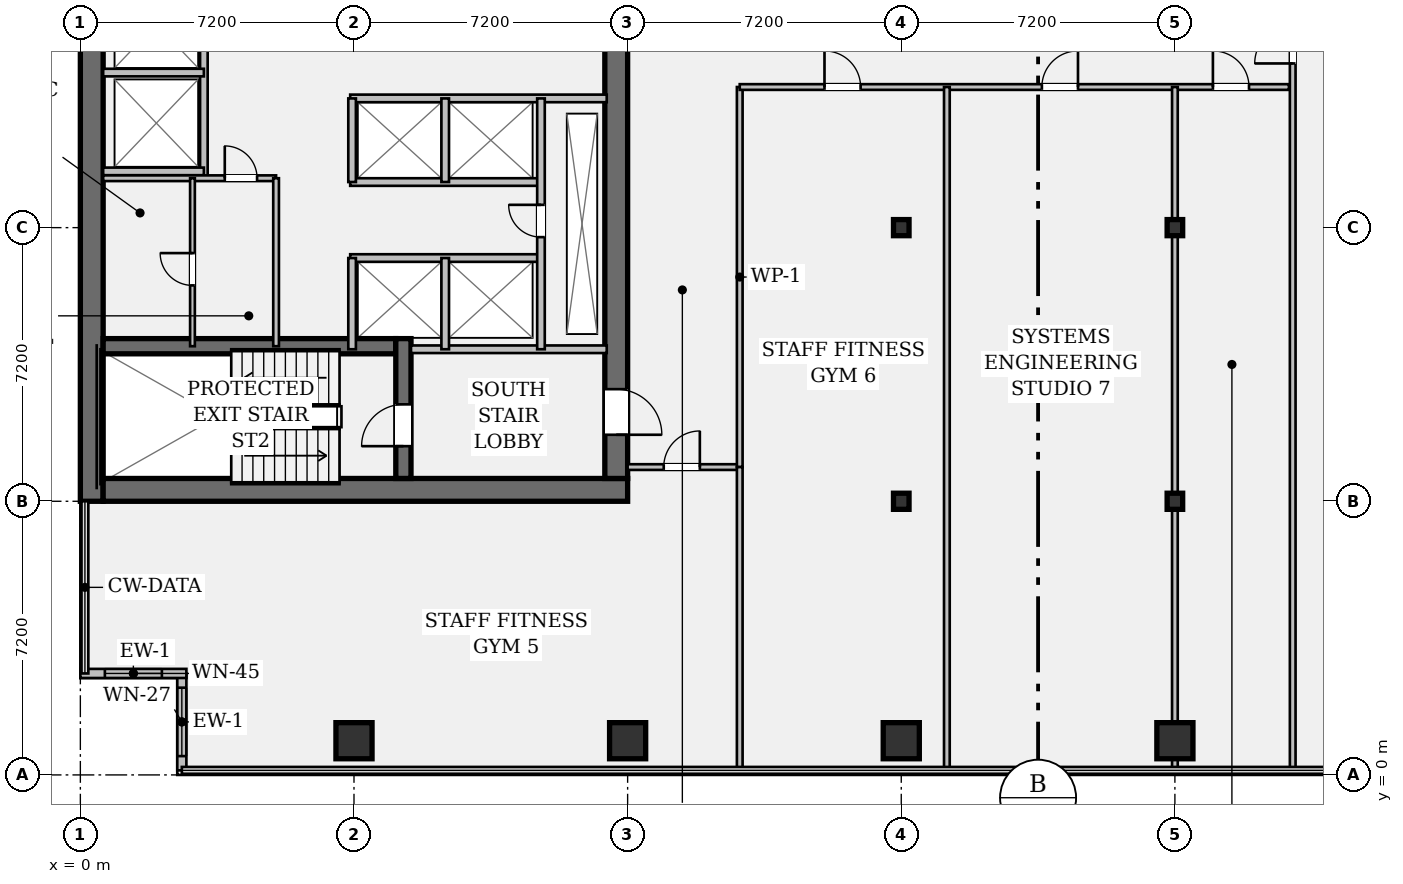
"""IFC4 building model, lengths in metres.
Left out: names, types, materials, properties, quantities, classifications, styles, units other than length and angle.
Written with IfcOpenShell. Run it as: python <this file> out.ifc"""

import sys

from ifc_helpers import new_model, si_unit, direction, frame, frame_2d, origin, origin_2d, place, context, subcontext, project, spatial, rectangle, hollow_rectangle, i_section, extrude, element, fill, save


model = new_model("IFC4")
c1 = context("Model", 3, precision=1e-05, world=origin(), true_north=direction((0.0, 1.0)))
c2 = subcontext(c1, "Body", "Model", "MODEL_VIEW")
j1 = project(units=[si_unit("LENGTHUNIT", "METRE"), si_unit("PLANEANGLEUNIT", "RADIAN")], contexts=[c1])
p1 = place(None, origin())
s1 = spatial("IfcSite", under=j1, at=p1, CompositionType="ELEMENT")
p2 = place(p1, origin())
s2 = spatial("IfcBuilding", under=s1, at=p2, CompositionType="ELEMENT")
p3 = place(p2, frame((0.0, 0.0, 81.2)))
s3 = spatial("IfcBuildingStorey", under=s2, at=p3, CompositionType="ELEMENT", Elevation=81.2)
p4 = place(p3, frame((0.3, 7.2, 0.0), z_axis=(0.0, 0.0, 1.0), x_axis=(0.0, 1.0, 0.0)))
e1 = element("IfcWall", 1, at=p4, inside=s3, PredefinedType="SHEAR", context=c2, shape_type="SweptSolid", body=[
    extrude(rectangle(XDim=28.8, YDim=0.6, at=frame_2d((14.4, 0.0))), origin(), (0.0, 0.0, 1.0), 3.57),
])
p5 = place(p3, frame((0.6, 7.5, 0.0), z_axis=(0.0, 0.0, 1.0), x_axis=(1.0, 0.0, 0.0)))
e2 = element("IfcWall", 2, at=p5, inside=s3, PredefinedType="SHEAR", context=c2, shape_type="SweptSolid", body=[
    extrude(rectangle(XDim=13.8, YDim=0.6, at=frame_2d((6.9, 0.0))), origin(), (0.0, 0.0, 1.0), 3.57),
])
p6 = place(p3, frame((14.1, 35.4, 0.0), z_axis=(0.0, 0.0, 1.0), x_axis=(0.0, -1.0, 0.0)))
e3 = element("IfcWall", 3, at=p6, inside=s3, PredefinedType="SHEAR", context=c2, shape_type="SweptSolid", body=[
    extrude(rectangle(XDim=27.6, YDim=0.6, at=frame_2d((13.8, 0.0))), origin(), (0.0, 0.0, 1.0), 3.57),
])
p7 = place(p6, frame((1.3, 0.0, 0.0)))
e4 = element("IfcOpeningElement", 4, at=p7, cuts=e3, PredefinedType="OPENING", context=c2, shape_type="SweptSolid", body=[
    extrude(rectangle(XDim=1.2, YDim=2.15, at=frame_2d((0.6, 1.075))), frame((0.0, 0.312, 0.0), z_axis=(0.0, -1.0, 0.0), x_axis=(1.0, 0.0, 0.0)), (0.0, 0.0, 1.0), 0.624),
])
p8 = place(p6, frame((25.25, 0.0, 0.0)))
e5 = element("IfcOpeningElement", 5, at=p8, cuts=e3, PredefinedType="OPENING", context=c2, shape_type="SweptSolid", body=[
    extrude(rectangle(XDim=1.2, YDim=2.15, at=frame_2d((0.6, 1.075))), frame((0.0, 0.312, 0.0), z_axis=(0.0, -1.0, 0.0), x_axis=(1.0, 0.0, 0.0)), (0.0, 0.0, 1.0), 0.624),
])
p9 = place(p6, frame((14.6, 0.0, 0.0)))
e6 = element("IfcOpeningElement", 6, at=p9, cuts=e3, PredefinedType="OPENING", context=c2, shape_type="SweptSolid", body=[
    extrude(rectangle(XDim=1.6, YDim=2.2, at=frame_2d((0.8, 1.1))), frame((0.0, 0.312, 0.0), z_axis=(0.0, -1.0, 0.0), x_axis=(1.0, 0.0, 0.0)), (0.0, 0.0, 1.0), 0.624),
])
p10 = place(p3, frame((0.6, 11.28, 0.0), z_axis=(0.0, 0.0, 1.0), x_axis=(1.0, 0.0, 0.0)))
e7 = element("IfcWall", 7, at=p10, inside=s3, PredefinedType="SHEAR", context=c2, shape_type="SweptSolid", body=[
    extrude(rectangle(XDim=7.7, YDim=0.4, at=frame_2d((3.85, 0.0))), origin(), (0.0, 0.0, 1.0), 3.57),
])
p11 = place(p3, frame((8.5, 7.8, 0.0), z_axis=(0.0, 0.0, 1.0), x_axis=(0.0, 1.0, 0.0)))
e8 = element("IfcWall", 8, at=p11, inside=s3, PredefinedType="SHEAR", context=c2, shape_type="SweptSolid", body=[
    extrude(rectangle(XDim=3.68, YDim=0.4, at=frame_2d((1.84, 0.0))), origin(), (0.0, 0.0, 1.0), 3.57),
])
p12 = place(p11, frame((0.85, 0.0, 0.0)))
e9 = element("IfcOpeningElement", 9, at=p12, cuts=e8, PredefinedType="OPENING", context=c2, shape_type="SweptSolid", body=[
    extrude(rectangle(XDim=1.1, YDim=2.15, at=frame_2d((0.55, 1.075))), frame((0.0, 0.212, 0.0), z_axis=(0.0, -1.0, 0.0), x_axis=(1.0, 0.0, 0.0)), (0.0, 0.0, 1.0), 0.424),
])
for number, where, z_axis, x_axis in (
    (10, (7.2, 0.9, 0.0), (0.0, 0.0, 1.0), (1.0, 0.0, 0.0)),
    (11, (14.4, 0.9, 0.0), (0.0, 0.0, 1.0), (1.0, 0.0, 0.0)),
    (12, (21.6, 0.9, 0.0), (0.0, 0.0, 1.0), (1.0, 0.0, 0.0)),
):
    element("IfcColumn", number, at=place(p3, frame(where, z_axis=z_axis, x_axis=x_axis)), inside=s3, PredefinedType="COLUMN", context=c2, shape_type="SweptSolid", body=[
        extrude(hollow_rectangle(XDim=0.95, YDim=0.95, WallThickness=0.06, at=origin_2d()), origin(), (0.0, 0.0, 1.0), 3.57),
    ])
for number, where, z_axis, x_axis in (
    (13, (21.6, 7.2, 0.0), (0.0, 0.0, 1.0), (1.0, 0.0, 0.0)),
    (14, (21.6, 14.4, 0.0), (0.0, 0.0, 1.0), (1.0, 0.0, 0.0)),
):
    element("IfcColumn", number, at=place(p3, frame(where, z_axis=z_axis, x_axis=x_axis)), inside=s3, PredefinedType="COLUMN", context=c2, shape_type="SweptSolid", body=[
        extrude(i_section(OverallWidth=0.409, OverallDepth=0.424, WebThickness=0.033, FlangeThickness=0.052, FilletRadius=0.018, at=origin_2d()), origin(), (0.0, 0.0, 1.0), 3.57),
    ])
p13 = place(p3, frame((28.8, 0.9, 0.0), z_axis=(0.0, 0.0, 1.0), x_axis=(1.0, 0.0, 0.0)))
e15 = element("IfcColumn", 15, at=p13, inside=s3, PredefinedType="COLUMN", context=c2, shape_type="SweptSolid", body=[
    extrude(hollow_rectangle(XDim=0.95, YDim=0.95, WallThickness=0.06, at=origin_2d()), origin(), (0.0, 0.0, 1.0), 3.57),
])
for number, where, z_axis, x_axis in (
    (16, (28.8, 7.2, 0.0), (0.0, 0.0, 1.0), (1.0, 0.0, 0.0)),
    (17, (28.8, 14.4, 0.0), (0.0, 0.0, 1.0), (1.0, 0.0, 0.0)),
):
    element("IfcColumn", number, at=place(p3, frame(where, z_axis=z_axis, x_axis=x_axis)), inside=s3, PredefinedType="COLUMN", context=c2, shape_type="SweptSolid", body=[
        extrude(i_section(OverallWidth=0.409, OverallDepth=0.424, WebThickness=0.033, FlangeThickness=0.052, FilletRadius=0.018, at=origin_2d()), origin(), (0.0, 0.0, 1.0), 3.57),
    ])
p14 = place(p3, frame((2.67, 0.12, 0.0), z_axis=(0.0, 0.0, 1.0), x_axis=(0.0, 1.0, 0.0)))
e18 = element("IfcWall", 18, at=p14, inside=s3, PredefinedType="STANDARD", context=c2, shape_type="SweptSolid", body=[
    extrude(rectangle(XDim=2.55, YDim=0.24, at=frame_2d((1.275, 0.0))), origin(), (0.0, 0.0, 1.0), 3.57),
])
p15 = place(p14, frame((0.375, 0.0, 0.95)))
e19 = element("IfcOpeningElement", 19, at=p15, cuts=e18, PredefinedType="OPENING", context=c2, shape_type="SweptSolid", body=[
    extrude(rectangle(XDim=1.8, YDim=1.35, at=frame_2d((0.9, 0.675))), frame((0.0, 0.132, 0.0), z_axis=(0.0, -1.0, 0.0), x_axis=(1.0, 0.0, 0.0)), (0.0, 0.0, 1.0), 0.264),
])
p16 = place(p3, frame((2.79, 2.67, 0.0), z_axis=(0.0, 0.0, 1.0), x_axis=(-1.0, 0.0, 0.0)))
e20 = element("IfcWall", 20, at=p16, inside=s3, PredefinedType="STANDARD", context=c2, shape_type="SweptSolid", body=[
    extrude(rectangle(XDim=2.79, YDim=0.24, at=frame_2d((1.395, 0.0))), origin(), (0.0, 0.0, 1.0), 3.57),
])
p17 = place(p16, frame((0.645, 0.0, 0.95)))
e21 = element("IfcOpeningElement", 21, at=p17, cuts=e20, PredefinedType="OPENING", context=c2, shape_type="SweptSolid", body=[
    extrude(rectangle(XDim=1.5, YDim=1.8, at=frame_2d((0.75, 0.9))), frame((0.0, 0.132, 0.0), z_axis=(0.0, -1.0, 0.0), x_axis=(1.0, 0.0, 0.0)), (0.0, 0.0, 1.0), 0.264),
])
p18 = place(p3, frame((8.7, 11.2, 0.0), z_axis=(0.0, 0.0, 1.0), x_axis=(1.0, 0.0, 0.0)))
e22 = element("IfcWall", 22, at=p18, inside=s3, PredefinedType="PARTITIONING", context=c2, shape_type="SweptSolid", body=[
    extrude(rectangle(XDim=5.15, YDim=0.2, at=frame_2d((2.575, 0.0))), origin(), (0.0, 0.0, 1.0), 3.57),
])
p19 = place(p3, frame((3.25, 15.7, 0.0), z_axis=(0.0, 0.0, 1.0), x_axis=(0.0, 1.0, 0.0)))
e23 = element("IfcWall", 23, at=p19, inside=s3, PredefinedType="PARTITIONING", context=c2, shape_type="SweptSolid", body=[
    extrude(rectangle(XDim=13.08, YDim=0.2, at=frame_2d((6.54, 0.0))), origin(), (0.0, 0.0, 1.0), 3.57),
])
for number, where, z_axis, x_axis in (
    (24, (0.6, 15.88, 0.0), (0.0, 0.0, 1.0), (1.0, 0.0, 0.0)),
    (25, (0.6, 18.48, 0.0), (0.0, 0.0, 1.0), (1.0, 0.0, 0.0)),
):
    element("IfcWall", number, at=place(p3, frame(where, z_axis=z_axis, x_axis=x_axis)), inside=s3, PredefinedType="PARTITIONING", context=c2, shape_type="SweptSolid", body=[
        extrude(rectangle(XDim=2.65, YDim=0.2, at=frame_2d((1.325, 0.0))), origin(), (0.0, 0.0, 1.0), 3.57),
    ])
p20 = place(p3, frame((7.1, 17.8, 0.0), z_axis=(0.0, 0.0, 1.0), x_axis=(1.0, 0.0, 0.0)))
e26 = element("IfcWall", 26, at=p20, inside=s3, PredefinedType="PARTITIONING", context=c2, shape_type="SweptSolid", body=[
    extrude(rectangle(XDim=6.75, YDim=0.2, at=frame_2d((3.375, 0.0))), origin(), (0.0, 0.0, 1.0), 3.57),
])
for number, where, z_axis, x_axis in (
    (27, (7.1, 15.6, 0.0), (0.0, 0.0, 1.0), (1.0, 0.0, 0.0)),
    (28, (7.1, 13.6, 0.0), (0.0, 0.0, 1.0), (1.0, 0.0, 0.0)),
):
    element("IfcWall", number, at=place(p3, frame(where, z_axis=z_axis, x_axis=x_axis)), inside=s3, PredefinedType="PARTITIONING", context=c2, shape_type="SweptSolid", body=[
        extrude(rectangle(XDim=5.02, YDim=0.2, at=frame_2d((2.51, 0.0))), origin(), (0.0, 0.0, 1.0), 3.57),
    ])
p21 = place(p3, frame((7.15, 15.6, 0.0), z_axis=(0.0, 0.0, 1.0), x_axis=(0.0, 1.0, 0.0)))
e29 = element("IfcWall", 29, at=p21, inside=s3, PredefinedType="PARTITIONING", context=c2, shape_type="SweptSolid", body=[
    extrude(rectangle(XDim=2.2, YDim=0.2, at=frame_2d((1.1, 0.0))), origin(), (0.0, 0.0, 1.0), 3.57),
])
p22 = place(p3, frame((7.15, 11.2, 0.0), z_axis=(0.0, 0.0, 1.0), x_axis=(0.0, 1.0, 0.0)))
e30 = element("IfcWall", 30, at=p22, inside=s3, PredefinedType="PARTITIONING", context=c2, shape_type="SweptSolid", body=[
    extrude(rectangle(XDim=2.4, YDim=0.2, at=frame_2d((1.2, 0.0))), origin(), (0.0, 0.0, 1.0), 3.57),
])
p23 = place(p3, frame((9.6, 15.6, 0.0), z_axis=(0.0, 0.0, 1.0), x_axis=(0.0, 1.0, 0.0)))
e31 = element("IfcWall", 31, at=p23, inside=s3, PredefinedType="PARTITIONING", context=c2, shape_type="SweptSolid", body=[
    extrude(rectangle(XDim=2.2, YDim=0.2, at=frame_2d((1.1, 0.0))), origin(), (0.0, 0.0, 1.0), 3.57),
])
p24 = place(p3, frame((9.6, 11.2, 0.0), z_axis=(0.0, 0.0, 1.0), x_axis=(0.0, 1.0, 0.0)))
e32 = element("IfcWall", 32, at=p24, inside=s3, PredefinedType="PARTITIONING", context=c2, shape_type="SweptSolid", body=[
    extrude(rectangle(XDim=2.4, YDim=0.2, at=frame_2d((1.2, 0.0))), origin(), (0.0, 0.0, 1.0), 3.57),
])
p25 = place(p3, frame((12.12, 11.2, 0.0), z_axis=(0.0, 0.0, 1.0), x_axis=(0.0, 1.0, 0.0)))
e33 = element("IfcWall", 33, at=p25, inside=s3, PredefinedType="PARTITIONING", context=c2, shape_type="SweptSolid", body=[
    extrude(rectangle(XDim=6.6, YDim=0.2, at=frame_2d((3.3, 0.0))), origin(), (0.0, 0.0, 1.0), 3.57),
])
p26 = place(p25, frame((2.95, 0.0, 0.0)))
e34 = element("IfcOpeningElement", 34, at=p26, cuts=e33, PredefinedType="OPENING", context=c2, shape_type="SweptSolid", body=[
    extrude(rectangle(XDim=0.85, YDim=2.15, at=frame_2d((0.425, 1.075))), frame((0.0, 0.112, 0.0), z_axis=(0.0, -1.0, 0.0), x_axis=(1.0, 0.0, 0.0)), (0.0, 0.0, 1.0), 0.224),
])
p27 = place(p3, frame((0.6, 15.7, 0.0), z_axis=(0.0, 0.0, 1.0), x_axis=(1.0, 0.0, 0.0)))
e35 = element("IfcWall", 35, at=p27, inside=s3, PredefinedType="PARTITIONING", context=c2, shape_type="SweptSolid", body=[
    extrude(rectangle(XDim=4.55, YDim=0.15, at=frame_2d((2.275, 0.0))), origin(), (0.0, 0.0, 1.0), 3.57),
])
p28 = place(p27, frame((3.2, 0.0, 0.0)))
e36 = element("IfcOpeningElement", 36, at=p28, cuts=e35, PredefinedType="OPENING", context=c2, shape_type="SweptSolid", body=[
    extrude(rectangle(XDim=0.85, YDim=2.15, at=frame_2d((0.425, 1.075))), frame((0.0, 0.087, 0.0), z_axis=(0.0, -1.0, 0.0), x_axis=(1.0, 0.0, 0.0)), (0.0, 0.0, 1.0), 0.174),
])
p29 = place(p3, frame((5.15, 11.28, 0.0), z_axis=(0.0, 0.0, 1.0), x_axis=(0.0, 1.0, 0.0)))
e37 = element("IfcWall", 37, at=p29, inside=s3, PredefinedType="PARTITIONING", context=c2, shape_type="SweptSolid", body=[
    extrude(rectangle(XDim=4.42, YDim=0.15, at=frame_2d((2.21, 0.0))), origin(), (0.0, 0.0, 1.0), 3.57),
])
p30 = place(p3, frame((2.95, 11.28, 0.0), z_axis=(0.0, 0.0, 1.0), x_axis=(0.0, 1.0, 0.0)))
e38 = element("IfcWall", 38, at=p30, inside=s3, PredefinedType="PARTITIONING", context=c2, shape_type="SweptSolid", body=[
    extrude(rectangle(XDim=4.42, YDim=0.125, at=frame_2d((2.21, 0.0))), origin(), (0.0, 0.0, 1.0), 3.57),
])
p31 = place(p30, frame((1.6, 0.0, 0.0)))
e39 = element("IfcOpeningElement", 39, at=p31, cuts=e38, PredefinedType="OPENING", context=c2, shape_type="SweptSolid", body=[
    extrude(rectangle(XDim=0.85, YDim=2.15, at=frame_2d((0.425, 1.075))), frame((0.0, 0.074, 0.0), z_axis=(0.0, -1.0, 0.0), x_axis=(1.0, 0.0, 0.0)), (0.0, 0.0, 1.0), 0.149),
])
p32 = place(p3, frame((14.4, 8.1, 0.0), z_axis=(0.0, 0.0, 1.0), x_axis=(1.0, 0.0, 0.0)))
e40 = element("IfcWall", 40, at=p32, inside=s3, PredefinedType="PARTITIONING", context=c2, shape_type="SweptSolid", body=[
    extrude(rectangle(XDim=2.95, YDim=0.15, at=frame_2d((1.475, 0.0))), origin(), (0.0, 0.0, 1.0), 3.088),
])
p33 = place(p32, frame((0.95, 0.0, 0.0)))
e41 = element("IfcOpeningElement", 41, at=p33, cuts=e40, PredefinedType="OPENING", context=c2, shape_type="SweptSolid", body=[
    extrude(rectangle(XDim=0.95, YDim=2.15, at=frame_2d((0.475, 1.075))), frame((0.0, 0.087, 0.0), z_axis=(0.0, -1.0, 0.0), x_axis=(1.0, 0.0, 0.0)), (0.0, 0.0, 1.0), 0.174),
])
p34 = place(p3, frame((17.35, 8.1, 0.0), z_axis=(0.0, 0.0, 1.0), x_axis=(0.0, 1.0, 0.0)))
e42 = element("IfcWall", 42, at=p34, inside=s3, PredefinedType="PARTITIONING", context=c2, shape_type="SweptSolid", body=[
    extrude(rectangle(XDim=10.0, YDim=0.15, at=frame_2d((5.0, 0.0))), origin(), (0.0, 0.0, 1.0), 2.783),
])
p35 = place(p3, frame((17.35, 18.1, 0.0), z_axis=(0.0, 0.0, 1.0), x_axis=(1.0, 0.0, 0.0)))
e43 = element("IfcWall", 43, at=p35, inside=s3, PredefinedType="PARTITIONING", context=c2, shape_type="SweptSolid", body=[
    extrude(rectangle(XDim=14.45, YDim=0.15, at=frame_2d((7.225, 0.0))), origin(), (0.0, 0.0, 1.0), 2.783),
])
p36 = place(p35, frame((2.23, 0.0, 0.0)))
e44 = element("IfcOpeningElement", 44, at=p36, cuts=e43, PredefinedType="OPENING", context=c2, shape_type="SweptSolid", body=[
    extrude(rectangle(XDim=0.95, YDim=2.15, at=frame_2d((0.475, 1.075))), frame((0.0, 0.087, 0.0), z_axis=(0.0, -1.0, 0.0), x_axis=(1.0, 0.0, 0.0)), (0.0, 0.0, 1.0), 0.174),
])
p37 = place(p35, frame((7.95, 0.0, 0.0)))
e45 = element("IfcOpeningElement", 45, at=p37, cuts=e43, PredefinedType="OPENING", context=c2, shape_type="SweptSolid", body=[
    extrude(rectangle(XDim=0.95, YDim=2.15, at=frame_2d((0.475, 1.075))), frame((0.0, 0.087, 0.0), z_axis=(0.0, -1.0, 0.0), x_axis=(1.0, 0.0, 0.0)), (0.0, 0.0, 1.0), 0.174),
])
p38 = place(p35, frame((12.45, 0.0, 0.0)))
e46 = element("IfcOpeningElement", 46, at=p38, cuts=e43, PredefinedType="OPENING", context=c2, shape_type="SweptSolid", body=[
    extrude(rectangle(XDim=0.95, YDim=2.15, at=frame_2d((0.475, 1.075))), frame((0.0, 0.087, 0.0), z_axis=(0.0, -1.0, 0.0), x_axis=(1.0, 0.0, 0.0)), (0.0, 0.0, 1.0), 0.174),
])
p39 = place(p3, frame((31.9, 0.12, 0.0), z_axis=(0.0, 0.0, 1.0), x_axis=(0.0, 1.0, 0.0)))
e47 = element("IfcWall", 47, at=p39, inside=s3, PredefinedType="PARTITIONING", context=c2, shape_type="SweptSolid", body=[
    extrude(rectangle(XDim=24.96, YDim=0.15, at=frame_2d((12.48, 0.0))), origin(), (0.0, 0.0, 1.0), 2.783),
])
p40 = place(p39, frame((18.6, 0.0, 0.0)))
e48 = element("IfcOpeningElement", 48, at=p40, cuts=e47, PredefinedType="OPENING", context=c2, shape_type="SweptSolid", body=[
    extrude(rectangle(XDim=1.0, YDim=2.15, at=frame_2d((0.5, 1.075))), frame((0.0, 0.087, 0.0), z_axis=(0.0, -1.0, 0.0), x_axis=(1.0, 0.0, 0.0)), (0.0, 0.0, 1.0), 0.174),
])
p41 = place(p3, frame((17.35, 0.12, 0.0), z_axis=(0.0, 0.0, 1.0), x_axis=(0.0, 1.0, 0.0)))
e49 = element("IfcWall", 49, at=p41, inside=s3, PredefinedType="PARTITIONING", context=c2, shape_type="SweptSolid", body=[
    extrude(rectangle(XDim=7.98, YDim=0.15, at=frame_2d((3.99, 0.0))), origin(), (0.0, 0.0, 1.0), 2.783),
])
for number, where, z_axis, x_axis in (
    (50, (22.8, 0.12, 0.0), (0.0, 0.0, 1.0), (0.0, 1.0, 0.0)),
    (51, (28.8, 0.12, 0.0), (0.0, 0.0, 1.0), (0.0, 1.0, 0.0)),
):
    element("IfcWall", number, at=place(p3, frame(where, z_axis=z_axis, x_axis=x_axis)), inside=s3, PredefinedType="PARTITIONING", context=c2, shape_type="SweptSolid", body=[
        extrude(rectangle(XDim=17.98, YDim=0.15, at=frame_2d((8.99, 0.0))), origin(), (0.0, 0.0, 1.0), 2.783),
    ])
p42 = place(p15, origin())
e52 = element("IfcWindow", 52, at=p42, inside=s3, PartitioningType="SINGLE_PANEL", PredefinedType="WINDOW", context=c2, shape_type="SweptSolid", body=[
    extrude(rectangle(XDim=1.8, YDim=1.35, at=frame_2d((0.9, 0.675))), frame((0.0, 0.03, 0.0), z_axis=(0.0, -1.0, 0.0), x_axis=(1.0, 0.0, 0.0)), (0.0, 0.0, 1.0), 0.06),
])
fill(e19, e52)
p43 = place(p17, origin())
e53 = element("IfcWindow", 53, at=p43, inside=s3, PartitioningType="SINGLE_PANEL", PredefinedType="WINDOW", context=c2, shape_type="SweptSolid", body=[
    extrude(rectangle(XDim=1.5, YDim=1.8, at=frame_2d((0.75, 0.9))), frame((0.0, 0.03, 0.0), z_axis=(0.0, -1.0, 0.0), x_axis=(1.0, 0.0, 0.0)), (0.0, 0.0, 1.0), 0.06),
])
fill(e21, e53)
p44 = place(p12, origin())
e54 = element("IfcDoor", 54, at=p44, inside=s3, OperationType="SINGLE_SWING_LEFT", PredefinedType="DOOR", context=c2, shape_type="SweptSolid", body=[
    extrude(rectangle(XDim=1.1, YDim=2.15, at=frame_2d((0.55, 1.075))), frame((0.0, 0.025, 0.0), z_axis=(0.0, -1.0, 0.0), x_axis=(1.0, 0.0, 0.0)), (0.0, 0.0, 1.0), 0.05),
])
fill(e9, e54)
p45 = place(p8, origin())
e55 = element("IfcDoor", 55, at=p45, inside=s3, OperationType="SINGLE_SWING_RIGHT", PredefinedType="DOOR", context=c2, shape_type="SweptSolid", body=[
    extrude(rectangle(XDim=1.2, YDim=2.15, at=frame_2d((0.6, 1.075))), frame((0.0, 0.025, 0.0), z_axis=(0.0, -1.0, 0.0), x_axis=(1.0, 0.0, 0.0)), (0.0, 0.0, 1.0), 0.05),
])
fill(e5, e55)
p46 = place(p26, origin())
e56 = element("IfcDoor", 56, at=p46, inside=s3, OperationType="SINGLE_SWING_RIGHT", PredefinedType="DOOR", context=c2, shape_type="SweptSolid", body=[
    extrude(rectangle(XDim=0.85, YDim=2.15, at=frame_2d((0.425, 1.075))), frame((0.0, 0.025, 0.0), z_axis=(0.0, -1.0, 0.0), x_axis=(1.0, 0.0, 0.0)), (0.0, 0.0, 1.0), 0.05),
])
fill(e34, e56)
p47 = place(p28, origin())
e57 = element("IfcDoor", 57, at=p47, inside=s3, OperationType="SINGLE_SWING_LEFT", PredefinedType="DOOR", context=c2, shape_type="SweptSolid", body=[
    extrude(rectangle(XDim=0.85, YDim=2.15, at=frame_2d((0.425, 1.075))), frame((0.0, 0.025, 0.0), z_axis=(0.0, -1.0, 0.0), x_axis=(1.0, 0.0, 0.0)), (0.0, 0.0, 1.0), 0.05),
])
fill(e36, e57)
p48 = place(p31, origin())
e58 = element("IfcDoor", 58, at=p48, inside=s3, OperationType="SINGLE_SWING_RIGHT", PredefinedType="DOOR", context=c2, shape_type="SweptSolid", body=[
    extrude(rectangle(XDim=0.85, YDim=2.15, at=frame_2d((0.425, 1.075))), frame((0.0, 0.025, 0.0), z_axis=(0.0, -1.0, 0.0), x_axis=(1.0, 0.0, 0.0)), (0.0, 0.0, 1.0), 0.05),
])
fill(e39, e58)
p49 = place(p33, origin())
e59 = element("IfcDoor", 59, at=p49, inside=s3, OperationType="SINGLE_SWING_RIGHT", PredefinedType="DOOR", context=c2, shape_type="SweptSolid", body=[
    extrude(rectangle(XDim=0.95, YDim=2.15, at=frame_2d((0.475, 1.075))), frame((0.0, 0.025, 0.0), z_axis=(0.0, -1.0, 0.0), x_axis=(1.0, 0.0, 0.0)), (0.0, 0.0, 1.0), 0.05),
])
fill(e41, e59)
p50 = place(p36, origin())
e60 = element("IfcDoor", 60, at=p50, inside=s3, OperationType="SINGLE_SWING_LEFT", PredefinedType="DOOR", context=c2, shape_type="SweptSolid", body=[
    extrude(rectangle(XDim=0.95, YDim=2.15, at=frame_2d((0.475, 1.075))), frame((0.0, 0.025, 0.0), z_axis=(0.0, -1.0, 0.0), x_axis=(1.0, 0.0, 0.0)), (0.0, 0.0, 1.0), 0.05),
])
fill(e44, e60)
p51 = place(p37, origin())
e61 = element("IfcDoor", 61, at=p51, inside=s3, OperationType="SINGLE_SWING_RIGHT", PredefinedType="DOOR", context=c2, shape_type="SweptSolid", body=[
    extrude(rectangle(XDim=0.95, YDim=2.15, at=frame_2d((0.475, 1.075))), frame((0.0, 0.025, 0.0), z_axis=(0.0, -1.0, 0.0), x_axis=(1.0, 0.0, 0.0)), (0.0, 0.0, 1.0), 0.05),
])
fill(e45, e61)
p52 = place(p38, origin())
e62 = element("IfcDoor", 62, at=p52, inside=s3, OperationType="SINGLE_SWING_LEFT", PredefinedType="DOOR", context=c2, shape_type="SweptSolid", body=[
    extrude(rectangle(XDim=0.95, YDim=2.15, at=frame_2d((0.475, 1.075))), frame((0.0, 0.025, 0.0), z_axis=(0.0, -1.0, 0.0), x_axis=(1.0, 0.0, 0.0)), (0.0, 0.0, 1.0), 0.05),
])
fill(e46, e62)
p53 = place(p40, origin())
e63 = element("IfcDoor", 63, at=p53, inside=s3, OperationType="SINGLE_SWING_LEFT", PredefinedType="DOOR", context=c2, shape_type="SweptSolid", body=[
    extrude(rectangle(XDim=1.0, YDim=2.15, at=frame_2d((0.5, 1.075))), frame((0.0, 0.025, 0.0), z_axis=(0.0, -1.0, 0.0), x_axis=(1.0, 0.0, 0.0)), (0.0, 0.0, 1.0), 0.05),
])
fill(e48, e63)
save(model, sys.argv[1])
